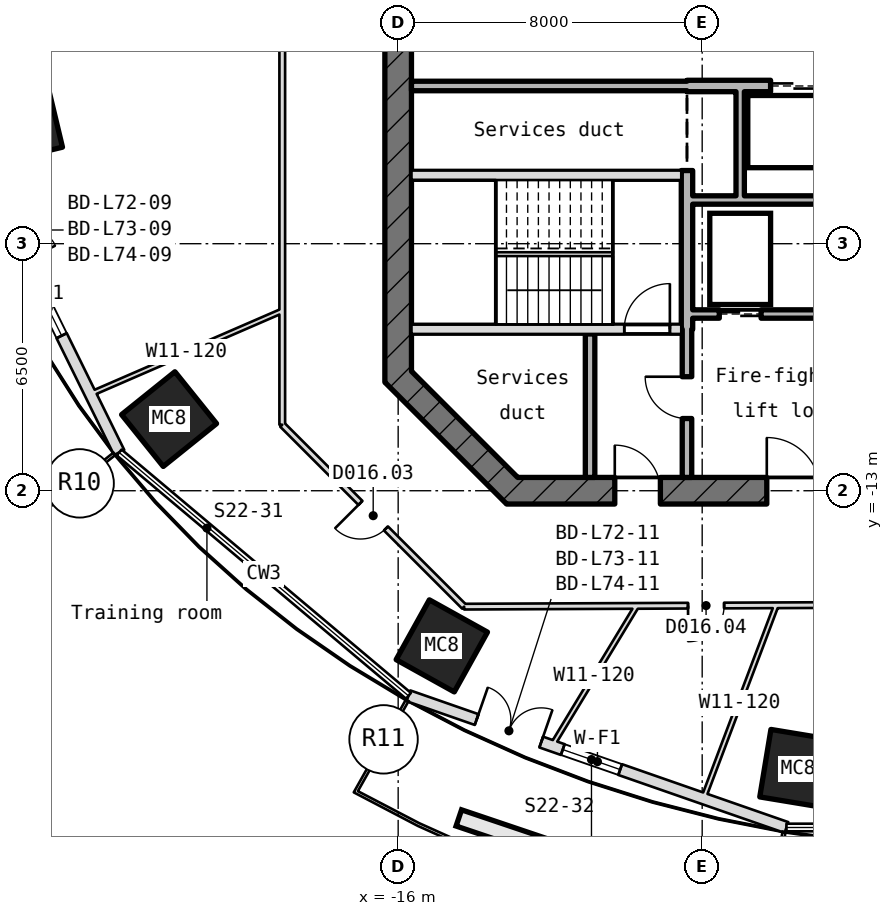
"""IFC4 building model, lengths in metres.
Left out: names, types, materials, properties, quantities, classifications, styles, units other than length and angle.
Written with IfcOpenShell. Run it as: python <this file> out.ifc"""

import sys

from ifc_helpers import new_model, si_unit, direction, frame, frame_2d, origin, origin_2d, place, context, subcontext, project, spatial, rectangle, hollow_rectangle, extrude, element, fill, save


model = new_model("IFC4")
c1 = context("Model", 3, precision=1e-05, world=origin(), true_north=direction((0.0, 1.0)))
c2 = subcontext(c1, "Body", "Model", "MODEL_VIEW")
j1 = project(units=[si_unit("LENGTHUNIT", "METRE"), si_unit("PLANEANGLEUNIT", "RADIAN")], contexts=[c1])
p1 = place(None, origin())
s1 = spatial("IfcSite", under=j1, at=p1, CompositionType="ELEMENT")
p2 = place(p1, origin())
s2 = spatial("IfcBuilding", under=s1, at=p2, CompositionType="ELEMENT")
p3 = place(p2, frame((0.0, 0.0, 321.85)))
s3 = spatial("IfcBuildingStorey", under=s2, at=p3, CompositionType="ELEMENT", Elevation=321.85)
for number, where, z_axis, x_axis in (
    (1, (-25.912, -3.319, -0.18), (0.0, 0.0, 1.0), (-0.233, 0.973, 0.0)),
    (2, (-22.028, -11.115, -0.18), (0.0, 0.0, 1.0), (-0.626, 0.779, 0.0)),
    (3, (-14.852, -17.082, -0.18), (0.0, 0.0, 1.0), (-0.874, 0.486, 0.0)),
    (4, (-5.475, -20.311, -0.18), (0.0, 0.0, 1.0), (-0.987, 0.163, 0.0)),
):
    element("IfcColumn", number, at=place(p3, frame(where, z_axis=z_axis, x_axis=x_axis)), inside=s3, PredefinedType="COLUMN", context=c2, shape_type="SweptSolid", body=[
        extrude(hollow_rectangle(XDim=1.75, YDim=1.8, WallThickness=0.055, at=origin_2d()), origin(), (0.0, 0.0, 1.0), 4.15),
    ])
p4 = place(p3, frame((-27.462, -3.627, 0.0), z_axis=(0.0, 0.0, 1.0), x_axis=(0.441822778199, -0.897102353505, 0.0)))
e5 = element("IfcWall", 5, at=p4, inside=s3, PredefinedType="SOLIDWALL", context=c2, shape_type="SweptSolid", body=[
    extrude(rectangle(XDim=9.325, YDim=0.3, at=frame_2d((4.663, 0.0))), origin(), (0.0, 0.0, 1.0), 3.97),
])
p5 = place(p4, frame((1.9, 0.0, 0.0)))
e6 = element("IfcOpeningElement", 6, at=p5, cuts=e5, PredefinedType="OPENING", context=c2, shape_type="SweptSolid", body=[
    extrude(rectangle(XDim=1.8, YDim=2.4, at=frame_2d((0.9, 1.2))), frame((0.0, 0.16, 0.0), z_axis=(0.0, -1.0, 0.0), x_axis=(1.0, 0.0, 0.0)), (0.0, 0.0, 1.0), 0.32),
])
p6 = place(p4, frame((4.3, 0.0, 0.9)))
e7 = element("IfcOpeningElement", 7, at=p6, cuts=e5, PredefinedType="OPENING", context=c2, shape_type="SweptSolid", body=[
    extrude(rectangle(XDim=1.6, YDim=1.5, at=frame_2d((0.8, 0.75))), frame((0.0, 0.16, 0.0), z_axis=(0.0, -1.0, 0.0), x_axis=(1.0, 0.0, 0.0)), (0.0, 0.0, 1.0), 0.32),
])
p7 = place(p3, frame((-15.729, -18.396, 0.0), z_axis=(0.0, 0.0, 1.0), x_axis=(0.944334385595, -0.328987185438, 0.0)))
e8 = element("IfcWall", 8, at=p7, inside=s3, PredefinedType="SOLIDWALL", context=c2, shape_type="SweptSolid", body=[
    extrude(rectangle(XDim=10.532, YDim=0.3, at=frame_2d((5.266, 0.0))), origin(), (0.0, 0.0, 1.0), 3.97),
])
p8 = place(p7, frame((1.9, 0.0, 0.0)))
e9 = element("IfcOpeningElement", 9, at=p8, cuts=e8, PredefinedType="OPENING", context=c2, shape_type="SweptSolid", body=[
    extrude(rectangle(XDim=1.8, YDim=2.4, at=frame_2d((0.9, 1.2))), frame((0.0, 0.16, 0.0), z_axis=(0.0, -1.0, 0.0), x_axis=(1.0, 0.0, 0.0)), (0.0, 0.0, 1.0), 0.32),
])
p9 = place(p7, frame((4.3, 0.0, 0.9)))
e10 = element("IfcOpeningElement", 10, at=p9, cuts=e8, PredefinedType="OPENING", context=c2, shape_type="SweptSolid", body=[
    extrude(rectangle(XDim=1.6, YDim=1.5, at=frame_2d((0.8, 0.75))), frame((0.0, 0.16, 0.0), z_axis=(0.0, -1.0, 0.0), x_axis=(1.0, 0.0, 0.0)), (0.0, 0.0, 1.0), 0.32),
])
p10 = place(p3, frame((-16.0, 10.145, -0.18), z_axis=(0.0, 0.0, 1.0), x_axis=(0.0, -1.0, 0.0)))
e11 = element("IfcWall", 11, at=p10, inside=s3, PredefinedType="SHEAR", context=c2, shape_type="SweptSolid", body=[
    extrude(rectangle(XDim=20.29, YDim=0.7, at=frame_2d((10.145, 0.0))), origin(), (0.0, 0.0, 1.0), 4.15),
])
p11 = place(p10, frame((8.945, 0.0, 0.18)))
e12 = element("IfcOpeningElement", 12, at=p11, cuts=e11, PredefinedType="OPENING", context=c2, shape_type="SweptSolid", body=[
    extrude(rectangle(XDim=2.4, YDim=2.1, at=frame_2d((1.2, 1.05))), frame((0.0, 0.36, 0.0), z_axis=(0.0, -1.0, 0.0), x_axis=(1.0, 0.0, 0.0)), (0.0, 0.0, 1.0), 0.72),
])
p12 = place(p10, frame((5.545, 0.0, 0.18)))
e13 = element("IfcOpeningElement", 13, at=p12, cuts=e11, PredefinedType="OPENING", context=c2, shape_type="SweptSolid", body=[
    extrude(rectangle(XDim=1.2, YDim=2.1, at=frame_2d((0.6, 1.05))), frame((0.0, 0.36, 0.0), z_axis=(0.0, -1.0, 0.0), x_axis=(1.0, 0.0, 0.0)), (0.0, 0.0, 1.0), 0.72),
])
p13 = place(p3, frame((-16.103, -9.897, -0.18), z_axis=(0.0, 0.0, 1.0), x_axis=(0.707106781187, -0.707106781187, 0.0)))
e14 = element("IfcWall", 14, at=p13, inside=s3, PredefinedType="SHEAR", context=c2, shape_type="SweptSolid", body=[
    extrude(rectangle(XDim=4.533, YDim=0.7, at=frame_2d((2.266, 0.0))), origin(), (0.0, 0.0, 1.0), 4.15),
])
p14 = place(p3, frame((-13.145, -13.0, -0.18), z_axis=(0.0, 0.0, 1.0), x_axis=(1.0, 0.0, 0.0)))
e15 = element("IfcWall", 15, at=p14, inside=s3, PredefinedType="SHEAR", context=c2, shape_type="SweptSolid", body=[
    extrude(rectangle(XDim=26.29, YDim=0.7, at=frame_2d((13.145, 0.0))), origin(), (0.0, 0.0, 1.0), 4.15),
])
p15 = place(p14, frame((2.845, 0.0, 0.18)))
e16 = element("IfcOpeningElement", 16, at=p15, cuts=e15, PredefinedType="OPENING", context=c2, shape_type="SweptSolid", body=[
    extrude(rectangle(XDim=1.2, YDim=2.1, at=frame_2d((0.6, 1.05))), frame((0.0, 0.36, 0.0), z_axis=(0.0, -1.0, 0.0), x_axis=(1.0, 0.0, 0.0)), (0.0, 0.0, 1.0), 0.72),
])
p16 = place(p14, frame((6.845, 0.0, 0.18)))
e17 = element("IfcOpeningElement", 17, at=p16, cuts=e15, PredefinedType="OPENING", context=c2, shape_type="SweptSolid", body=[
    extrude(rectangle(XDim=1.4, YDim=2.1, at=frame_2d((0.7, 1.05))), frame((0.0, 0.36, 0.0), z_axis=(0.0, -1.0, 0.0), x_axis=(1.0, 0.0, 0.0)), (0.0, 0.0, 1.0), 0.72),
])
p17 = place(p14, frame((15.445, 0.0, 0.18)))
e18 = element("IfcOpeningElement", 18, at=p17, cuts=e15, PredefinedType="OPENING", context=c2, shape_type="SweptSolid", body=[
    extrude(rectangle(XDim=1.4, YDim=2.1, at=frame_2d((0.7, 1.05))), frame((0.0, 0.36, 0.0), z_axis=(0.0, -1.0, 0.0), x_axis=(1.0, 0.0, 0.0)), (0.0, 0.0, 1.0), 0.72),
])
p18 = place(p3, frame((-15.65, -8.75, -0.18), z_axis=(0.0, 0.0, 1.0), x_axis=(1.0, 0.0, 0.0)))
e19 = element("IfcWall", 19, at=p18, inside=s3, PredefinedType="SHEAR", context=c2, shape_type="SweptSolid", body=[
    extrude(rectangle(XDim=7.1, YDim=0.25, at=frame_2d((3.55, 0.0))), origin(), (0.0, 0.0, 1.0), 4.15),
])
p19 = place(p18, frame((5.6, 0.0, 0.18)))
e20 = element("IfcOpeningElement", 20, at=p19, cuts=e19, PredefinedType="OPENING", context=c2, shape_type="SweptSolid", body=[
    extrude(rectangle(XDim=1.2, YDim=2.1, at=frame_2d((0.6, 1.05))), frame((0.0, 0.135, 0.0), z_axis=(0.0, -1.0, 0.0), x_axis=(1.0, 0.0, 0.0)), (0.0, 0.0, 1.0), 0.27),
])
p20 = place(p3, frame((-8.25, -8.35, 0.0), z_axis=(0.0, 0.0, 1.0), x_axis=(1.0, 0.0, 0.0)))
e21 = element("IfcWall", 21, at=p20, inside=s3, PredefinedType="STANDARD", context=c2, shape_type="SweptSolid", body=[
    extrude(rectangle(XDim=5.34, YDim=0.22, at=frame_2d((2.67, 0.0))), origin(), (0.0, 0.0, 1.0), 3.97),
])
p21 = place(p20, frame((0.7, 0.0, 0.0)))
e22 = element("IfcOpeningElement", 22, at=p21, cuts=e21, PredefinedType="OPENING", context=c2, shape_type="SweptSolid", body=[
    extrude(rectangle(XDim=1.1, YDim=2.1, at=frame_2d((0.55, 1.05))), frame((0.0, 0.12, 0.0), z_axis=(0.0, -1.0, 0.0), x_axis=(1.0, 0.0, 0.0)), (0.0, 0.0, 1.0), 0.24),
])
p22 = place(p20, frame((3.5, 0.0, 0.0)))
e23 = element("IfcOpeningElement", 23, at=p22, cuts=e21, PredefinedType="OPENING", context=c2, shape_type="SweptSolid", body=[
    extrude(rectangle(XDim=1.1, YDim=2.1, at=frame_2d((0.55, 1.05))), frame((0.0, 0.12, 0.0), z_axis=(0.0, -1.0, 0.0), x_axis=(1.0, 0.0, 0.0)), (0.0, 0.0, 1.0), 0.24),
])
p23 = place(p3, frame((-8.25, -5.35, 0.0), z_axis=(0.0, 0.0, 1.0), x_axis=(1.0, 0.0, 0.0)))
e24 = element("IfcWall", 24, at=p23, inside=s3, PredefinedType="STANDARD", context=c2, shape_type="SweptSolid", body=[
    extrude(rectangle(XDim=16.5, YDim=0.22, at=frame_2d((8.25, 0.0))), origin(), (0.0, 0.0, 1.0), 3.97),
])
p24 = place(p3, frame((-15.65, -4.7, -0.18), z_axis=(0.0, 0.0, 1.0), x_axis=(1.0, 0.0, 0.0)))
e25 = element("IfcWall", 25, at=p24, inside=s3, PredefinedType="SHEAR", context=c2, shape_type="SweptSolid", body=[
    extrude(rectangle(XDim=7.1, YDim=0.25, at=frame_2d((3.55, 0.0))), origin(), (0.0, 0.0, 1.0), 4.15),
])
p25 = place(p3, frame((-15.65, -2.35, 0.0), z_axis=(0.0, 0.0, 1.0), x_axis=(1.0, 0.0, 0.0)))
e26 = element("IfcWall", 26, at=p25, inside=s3, PredefinedType="STANDARD", context=c2, shape_type="SweptSolid", body=[
    extrude(rectangle(XDim=7.25, YDim=0.25, at=frame_2d((3.625, 0.0))), origin(), (0.0, 0.0, 1.0), 3.97),
])
p26 = place(p3, frame((-8.4, -2.35, -0.18), z_axis=(0.0, 0.0, 1.0), x_axis=(1.0, 0.0, 0.0)))
e27 = element("IfcWall", 27, at=p26, inside=s3, PredefinedType="SHEAR", context=c2, shape_type="SweptSolid", body=[
    extrude(rectangle(XDim=16.8, YDim=0.3, at=frame_2d((8.4, 0.0))), origin(), (0.0, 0.0, 1.0), 4.15),
])
p27 = place(p26, frame((2.2, 0.0, 0.18)))
e28 = element("IfcOpeningElement", 28, at=p27, cuts=e27, PredefinedType="OPENING", context=c2, shape_type="SweptSolid", body=[
    extrude(rectangle(XDim=1.2, YDim=2.1, at=frame_2d((0.6, 1.05))), frame((0.0, 0.16, 0.0), z_axis=(0.0, -1.0, 0.0), x_axis=(1.0, 0.0, 0.0)), (0.0, 0.0, 1.0), 0.32),
])
p28 = place(p26, frame((5.0, 0.0, 0.18)))
e29 = element("IfcOpeningElement", 29, at=p28, cuts=e27, PredefinedType="OPENING", context=c2, shape_type="SweptSolid", body=[
    extrude(rectangle(XDim=1.2, YDim=2.1, at=frame_2d((0.6, 1.05))), frame((0.0, 0.16, 0.0), z_axis=(0.0, -1.0, 0.0), x_axis=(1.0, 0.0, 0.0)), (0.0, 0.0, 1.0), 0.32),
])
p29 = place(p26, frame((7.8, 0.0, 0.18)))
e30 = element("IfcOpeningElement", 30, at=p29, cuts=e27, PredefinedType="OPENING", context=c2, shape_type="SweptSolid", body=[
    extrude(rectangle(XDim=1.2, YDim=2.1, at=frame_2d((0.6, 1.05))), frame((0.0, 0.16, 0.0), z_axis=(0.0, -1.0, 0.0), x_axis=(1.0, 0.0, 0.0)), (0.0, 0.0, 1.0), 0.32),
])
p30 = place(p26, frame((10.6, 0.0, 0.18)))
e31 = element("IfcOpeningElement", 31, at=p30, cuts=e27, PredefinedType="OPENING", context=c2, shape_type="SweptSolid", body=[
    extrude(rectangle(XDim=1.2, YDim=2.1, at=frame_2d((0.6, 1.05))), frame((0.0, 0.16, 0.0), z_axis=(0.0, -1.0, 0.0), x_axis=(1.0, 0.0, 0.0)), (0.0, 0.0, 1.0), 0.32),
])
p31 = place(p26, frame((13.4, 0.0, 0.18)))
e32 = element("IfcOpeningElement", 32, at=p31, cuts=e27, PredefinedType="OPENING", context=c2, shape_type="SweptSolid", body=[
    extrude(rectangle(XDim=1.2, YDim=2.1, at=frame_2d((0.6, 1.05))), frame((0.0, 0.16, 0.0), z_axis=(0.0, -1.0, 0.0), x_axis=(1.0, 0.0, 0.0)), (0.0, 0.0, 1.0), 0.32),
])
p32 = place(p3, frame((-10.95, -12.65, 0.0), z_axis=(0.0, 0.0, 1.0), x_axis=(0.0, 1.0, 0.0)))
e33 = element("IfcWall", 33, at=p32, inside=s3, PredefinedType="STANDARD", context=c2, shape_type="SweptSolid", body=[
    extrude(rectangle(XDim=3.775, YDim=0.25, at=frame_2d((1.887, 0.0))), origin(), (0.0, 0.0, 1.0), 3.97),
])
p33 = place(p3, frame((-8.4, -12.65, 0.0), z_axis=(0.0, 0.0, 1.0), x_axis=(0.0, 1.0, 0.0)))
e34 = element("IfcWall", 34, at=p33, inside=s3, PredefinedType="STANDARD", context=c2, shape_type="SweptSolid", body=[
    extrude(rectangle(XDim=3.9, YDim=0.25, at=frame_2d((1.95, 0.0))), origin(), (0.0, 0.0, 1.0), 3.97),
])
p34 = place(p33, frame((1.55, 0.0, 0.0)))
e35 = element("IfcOpeningElement", 35, at=p34, cuts=e34, PredefinedType="OPENING", context=c2, shape_type="SweptSolid", body=[
    extrude(rectangle(XDim=1.1, YDim=2.1, at=frame_2d((0.55, 1.05))), frame((0.0, 0.135, 0.0), z_axis=(0.0, -1.0, 0.0), x_axis=(1.0, 0.0, 0.0)), (0.0, 0.0, 1.0), 0.27),
])
p35 = place(p3, frame((-8.4, -8.75, -0.18), z_axis=(0.0, 0.0, 1.0), x_axis=(0.0, 1.0, 0.0)))
e36 = element("IfcWall", 36, at=p35, inside=s3, PredefinedType="SHEAR", context=c2, shape_type="SweptSolid", body=[
    extrude(rectangle(XDim=4.175, YDim=0.3, at=frame_2d((2.087, 0.0))), origin(), (0.0, 0.0, 1.0), 4.15),
])
p36 = place(p3, frame((-7.0, -5.24, 0.0), z_axis=(0.0, 0.0, 1.0), x_axis=(0.0, 1.0, 0.0)))
e37 = element("IfcWall", 37, at=p36, inside=s3, PredefinedType="STANDARD", context=c2, shape_type="SweptSolid", body=[
    extrude(rectangle(XDim=2.74, YDim=0.22, at=frame_2d((1.37, 0.0))), origin(), (0.0, 0.0, 1.0), 3.97),
])
p37 = place(p3, frame((-19.05, -11.263, 0.0), z_axis=(0.0, 0.0, 1.0), x_axis=(0.0, 1.0, 0.0)))
e38 = element("IfcWall", 38, at=p37, inside=s3, PredefinedType="PARTITIONING", context=c2, shape_type="SweptSolid", body=[
    extrude(rectangle(XDim=22.527, YDim=0.15, at=frame_2d((11.263, 0.0))), origin(), (0.0, 0.0, 1.0), 3.97),
])
p38 = place(p37, frame((13.745, 0.0, 0.0)))
e39 = element("IfcOpeningElement", 39, at=p38, cuts=e38, PredefinedType="OPENING", context=c2, shape_type="SweptSolid", body=[
    extrude(rectangle(XDim=0.95, YDim=2.1, at=frame_2d((0.475, 1.05))), frame((0.0, 0.085, 0.0), z_axis=(0.0, -1.0, 0.0), x_axis=(1.0, 0.0, 0.0)), (0.0, 0.0, 1.0), 0.17),
])
p39 = place(p3, frame((-19.05, -8.266, 0.0), z_axis=(0.0, 0.0, 1.0), x_axis=(-0.917352652967, -0.398075508031, 0.0)))
e40 = element("IfcWall", 40, at=p39, inside=s3, PredefinedType="PARTITIONING", context=c2, shape_type="SweptSolid", body=[
    extrude(rectangle(XDim=5.503, YDim=0.12, at=frame_2d((2.751, 0.0))), origin(), (0.0, 0.0, 1.0), 3.97),
])
p40 = place(p3, frame((-14.263, -16.05, 0.0), z_axis=(0.0, 0.0, 1.0), x_axis=(-0.707106781187, 0.707106781187, 0.0)))
e41 = element("IfcWall", 41, at=p40, inside=s3, PredefinedType="PARTITIONING", context=c2, shape_type="SweptSolid", body=[
    extrude(rectangle(XDim=6.769, YDim=0.15, at=frame_2d((3.385, 0.0))), origin(), (0.0, 0.0, 1.0), 3.97),
])
p41 = place(p40, frame((2.91, 0.0, 0.0)))
e42 = element("IfcOpeningElement", 42, at=p41, cuts=e41, PredefinedType="OPENING", context=c2, shape_type="SweptSolid", body=[
    extrude(rectangle(XDim=0.95, YDim=2.1, at=frame_2d((0.475, 1.05))), frame((0.0, 0.085, 0.0), z_axis=(0.0, -1.0, 0.0), x_axis=(1.0, 0.0, 0.0)), (0.0, 0.0, 1.0), 0.17),
])
p42 = place(p3, frame((-9.732, -16.05, 0.0), z_axis=(0.0, 0.0, 1.0), x_axis=(-0.518455854968, -0.855104395059, 0.0)))
e43 = element("IfcWall", 43, at=p42, inside=s3, PredefinedType="PARTITIONING", context=c2, shape_type="SweptSolid", body=[
    extrude(rectangle(XDim=4.282, YDim=0.12, at=frame_2d((2.141, 0.0))), origin(), (0.0, 0.0, 1.0), 3.97),
])
p43 = place(p3, frame((-6.063, -16.05, 0.0), z_axis=(0.0, 0.0, 1.0), x_axis=(-0.353368021135, -0.935484388774, 0.0)))
e44 = element("IfcWall", 44, at=p43, inside=s3, PredefinedType="PARTITIONING", context=c2, shape_type="SweptSolid", body=[
    extrude(rectangle(XDim=5.397, YDim=0.12, at=frame_2d((2.699, 0.0))), origin(), (0.0, 0.0, 1.0), 3.97),
])
p44 = place(p3, frame((14.176, -15.926, 0.0), z_axis=(0.0, 0.0, 1.0), x_axis=(-0.99999052853, -0.004352338421, 0.0)))
e45 = element("IfcWall", 45, at=p44, inside=s3, PredefinedType="PARTITIONING", context=c2, shape_type="SweptSolid", body=[
    extrude(rectangle(XDim=28.44, YDim=0.15, at=frame_2d((14.22, 0.0))), origin(), (0.0, 0.0, 1.0), 3.97),
])
p45 = place(p44, frame((21.599, 0.0, 0.0)))
e46 = element("IfcOpeningElement", 46, at=p45, cuts=e45, PredefinedType="OPENING", context=c2, shape_type="SweptSolid", body=[
    extrude(rectangle(XDim=0.95, YDim=2.1, at=frame_2d((0.475, 1.05))), frame((0.0, 0.085, 0.0), z_axis=(0.0, -1.0, 0.0), x_axis=(1.0, 0.0, 0.0)), (0.0, 0.0, 1.0), 0.17),
])
p46 = place(p44, frame((16.88, 0.0, 0.0)))
e47 = element("IfcOpeningElement", 47, at=p46, cuts=e45, PredefinedType="OPENING", context=c2, shape_type="SweptSolid", body=[
    extrude(rectangle(XDim=0.95, YDim=2.1, at=frame_2d((0.475, 1.05))), frame((0.0, 0.085, 0.0), z_axis=(0.0, -1.0, 0.0), x_axis=(1.0, 0.0, 0.0)), (0.0, 0.0, 1.0), 0.17),
])
p47 = place(p44, frame((10.427, 0.0, 0.0)))
e48 = element("IfcOpeningElement", 48, at=p47, cuts=e45, PredefinedType="OPENING", context=c2, shape_type="SweptSolid", body=[
    extrude(rectangle(XDim=0.95, YDim=2.1, at=frame_2d((0.475, 1.05))), frame((0.0, 0.085, 0.0), z_axis=(0.0, -1.0, 0.0), x_axis=(1.0, 0.0, 0.0)), (0.0, 0.0, 1.0), 0.17),
])
p48 = place(p44, frame((4.942, 0.0, 0.0)))
e49 = element("IfcOpeningElement", 49, at=p48, cuts=e45, PredefinedType="OPENING", context=c2, shape_type="SweptSolid", body=[
    extrude(rectangle(XDim=0.95, YDim=2.1, at=frame_2d((0.475, 1.05))), frame((0.0, 0.085, 0.0), z_axis=(0.0, -1.0, 0.0), x_axis=(1.0, 0.0, 0.0)), (0.0, 0.0, 1.0), 0.17),
])
p49 = place(p6, origin())
e50 = element("IfcWindow", 50, at=p49, inside=s3, PartitioningType="SINGLE_PANEL", PredefinedType="WINDOW", context=c2, shape_type="SweptSolid", body=[
    extrude(rectangle(XDim=1.6, YDim=1.5, at=frame_2d((0.8, 0.75))), frame((0.0, 0.03, 0.0), z_axis=(0.0, -1.0, 0.0), x_axis=(1.0, 0.0, 0.0)), (0.0, 0.0, 1.0), 0.06),
])
fill(e7, e50)
p50 = place(p8, origin())
e51 = element("IfcDoor", 51, at=p50, inside=s3, OperationType="SINGLE_SWING_LEFT", PredefinedType="DOOR", context=c2, shape_type="SweptSolid", body=[
    extrude(rectangle(XDim=1.8, YDim=2.4, at=frame_2d((0.9, 1.2))), frame((0.0, 0.025, 0.0), z_axis=(0.0, -1.0, 0.0), x_axis=(1.0, 0.0, 0.0)), (0.0, 0.0, 1.0), 0.05),
])
fill(e9, e51)
p51 = place(p9, origin())
e52 = element("IfcWindow", 52, at=p51, inside=s3, PartitioningType="SINGLE_PANEL", PredefinedType="WINDOW", context=c2, shape_type="SweptSolid", body=[
    extrude(rectangle(XDim=1.6, YDim=1.5, at=frame_2d((0.8, 0.75))), frame((0.0, 0.03, 0.0), z_axis=(0.0, -1.0, 0.0), x_axis=(1.0, 0.0, 0.0)), (0.0, 0.0, 1.0), 0.06),
])
fill(e10, e52)
p52 = place(p27, origin())
e53 = element("IfcDoor", 53, at=p52, inside=s3, OperationType="DOUBLE_DOOR_SLIDING", PredefinedType="DOOR", context=c2, shape_type="SweptSolid", body=[
    extrude(rectangle(XDim=1.2, YDim=2.1, at=frame_2d((0.6, 1.05))), frame((0.0, 0.025, 0.0), z_axis=(0.0, -1.0, 0.0), x_axis=(1.0, 0.0, 0.0)), (0.0, 0.0, 1.0), 0.05),
])
fill(e28, e53)
p53 = place(p21, origin())
e54 = element("IfcDoor", 54, at=p53, inside=s3, OperationType="DOUBLE_DOOR_SLIDING", PredefinedType="DOOR", context=c2, shape_type="SweptSolid", body=[
    extrude(rectangle(XDim=1.1, YDim=2.1, at=frame_2d((0.55, 1.05))), frame((0.0, 0.025, 0.0), z_axis=(0.0, -1.0, 0.0), x_axis=(1.0, 0.0, 0.0)), (0.0, 0.0, 1.0), 0.05),
])
fill(e22, e54)
p54 = place(p19, origin())
e55 = element("IfcDoor", 55, at=p54, inside=s3, OperationType="SINGLE_SWING_RIGHT", PredefinedType="DOOR", context=c2, shape_type="SweptSolid", body=[
    extrude(rectangle(XDim=1.2, YDim=2.1, at=frame_2d((0.6, 1.05))), frame((0.0, 0.025, 0.0), z_axis=(0.0, -1.0, 0.0), x_axis=(1.0, 0.0, 0.0)), (0.0, 0.0, 1.0), 0.05),
])
fill(e20, e55)
p55 = place(p34, origin())
e56 = element("IfcDoor", 56, at=p55, inside=s3, OperationType="SINGLE_SWING_RIGHT", PredefinedType="DOOR", context=c2, shape_type="SweptSolid", body=[
    extrude(rectangle(XDim=1.1, YDim=2.1, at=frame_2d((0.55, 1.05))), frame((0.0, 0.025, 0.0), z_axis=(0.0, -1.0, 0.0), x_axis=(1.0, 0.0, 0.0)), (0.0, 0.0, 1.0), 0.05),
])
fill(e35, e56)
p56 = place(p15, origin())
e57 = element("IfcDoor", 57, at=p56, inside=s3, OperationType="SINGLE_SWING_RIGHT", PredefinedType="DOOR", context=c2, shape_type="SweptSolid", body=[
    extrude(rectangle(XDim=1.2, YDim=2.1, at=frame_2d((0.6, 1.05))), frame((0.0, 0.025, 0.0), z_axis=(0.0, -1.0, 0.0), x_axis=(1.0, 0.0, 0.0)), (0.0, 0.0, 1.0), 0.05),
])
fill(e16, e57)
p57 = place(p16, origin())
e58 = element("IfcDoor", 58, at=p57, inside=s3, OperationType="SINGLE_SWING_RIGHT", PredefinedType="DOOR", context=c2, shape_type="SweptSolid", body=[
    extrude(rectangle(XDim=1.4, YDim=2.1, at=frame_2d((0.7, 1.05))), frame((0.0, 0.025, 0.0), z_axis=(0.0, -1.0, 0.0), x_axis=(1.0, 0.0, 0.0)), (0.0, 0.0, 1.0), 0.05),
])
fill(e17, e58)
p58 = place(p41, origin())
e59 = element("IfcDoor", 59, at=p58, inside=s3, OperationType="SINGLE_SWING_RIGHT", PredefinedType="DOOR", context=c2, shape_type="SweptSolid", body=[
    extrude(rectangle(XDim=0.95, YDim=2.1, at=frame_2d((0.475, 1.05))), frame((0.0, 0.025, 0.0), z_axis=(0.0, -1.0, 0.0), x_axis=(1.0, 0.0, 0.0)), (0.0, 0.0, 1.0), 0.05),
])
fill(e42, e59)
p59 = place(p45, origin())
e60 = element("IfcDoor", 60, at=p59, inside=s3, OperationType="SINGLE_SWING_RIGHT", PredefinedType="DOOR", context=c2, shape_type="SweptSolid", body=[
    extrude(rectangle(XDim=0.95, YDim=2.1, at=frame_2d((0.475, 1.05))), frame((0.0, 0.025, 0.0), z_axis=(0.0, -1.0, 0.0), x_axis=(1.0, 0.0, 0.0)), (0.0, 0.0, 1.0), 0.05),
])
fill(e46, e60)
save(model, sys.argv[1])
